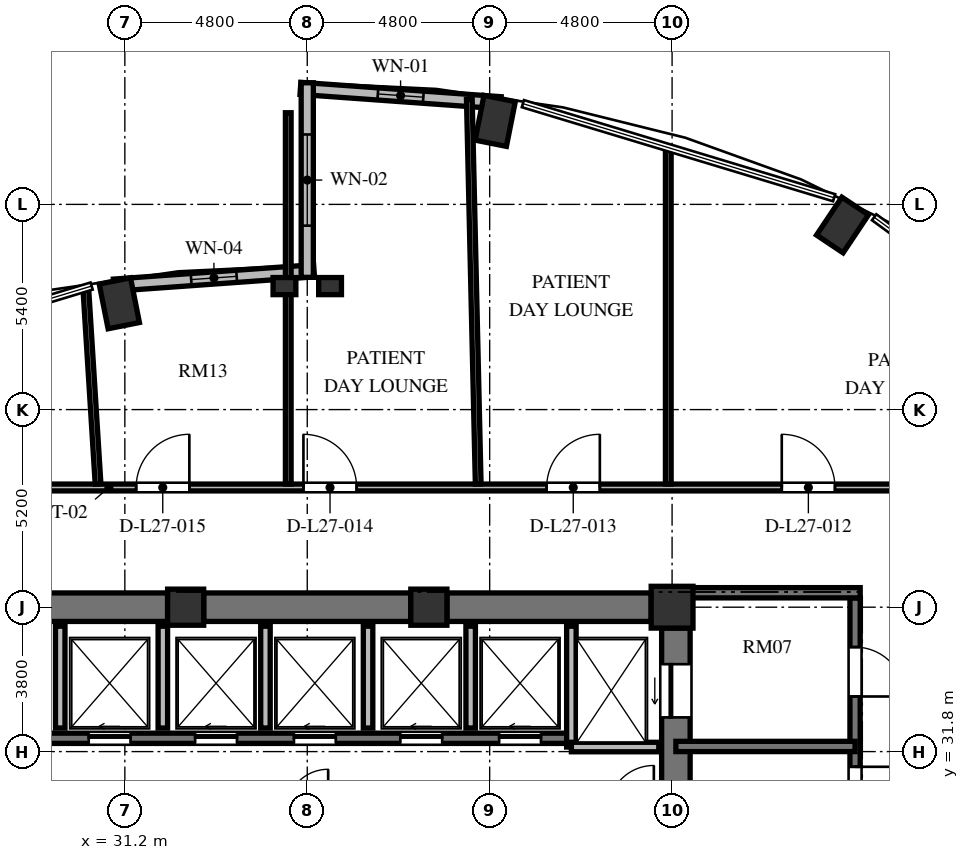
"""IFC4 building model, lengths in metres.
Left out: names, types, materials, properties, quantities, classifications, styles, units other than length and angle.
Written with IfcOpenShell. Run it as: python <this file> out.ifc"""

import sys

from ifc_helpers import new_model, si_unit, direction, frame, frame_2d, origin, origin_2d, place, context, subcontext, project, spatial, rectangle, extrude, element, fill, save


model = new_model("IFC4")
c1 = context("Model", 3, precision=1e-05, world=origin(), true_north=direction((0.0, 1.0)))
c2 = subcontext(c1, "Body", "Model", "MODEL_VIEW")
j1 = project(units=[si_unit("LENGTHUNIT", "METRE"), si_unit("PLANEANGLEUNIT", "RADIAN")], contexts=[c1])
p1 = place(None, origin())
s1 = spatial("IfcSite", under=j1, at=p1, CompositionType="ELEMENT")
p2 = place(p1, origin())
s2 = spatial("IfcBuilding", under=s1, at=p2, CompositionType="ELEMENT")
p3 = place(p2, frame((0.0, 0.0, 107.28)))
s3 = spatial("IfcBuildingStorey", under=s2, at=p3, CompositionType="ELEMENT", Elevation=107.28)
for number, where, z_axis, x_axis in (
    (1, (50.084, 45.657, 0.0), (0.0, 0.0, 1.0), (0.556, 0.831, 0.0)),
    (2, (40.946, 48.397, 0.0), (0.0, 0.0, 1.0), (0.195, 0.981, 0.0)),
    (3, (31.054, 43.597, 0.0), (0.0, 0.0, 1.0), (-0.195, 0.981, 0.0)),
):
    element("IfcColumn", number, at=place(p3, frame(where, z_axis=z_axis, x_axis=x_axis)), inside=s3, PredefinedType="COLUMN", context=c2, shape_type="SweptSolid", body=[
        extrude(rectangle(XDim=1.2, YDim=0.84, at=origin_2d()), origin(), (0.0, 0.0, 1.0), 3.648),
    ])
p4 = place(p3, frame((45.6, 35.6, 0.0), z_axis=(0.0, 0.0, 1.0), x_axis=(1.0, 0.0, 0.0)))
e4 = element("IfcColumn", 4, at=p4, inside=s3, PredefinedType="COLUMN", context=c2, shape_type="SweptSolid", body=[
    extrude(rectangle(XDim=1.1, YDim=1.1, at=origin_2d()), origin(), (0.0, 0.0, 1.0), 3.648),
])
for number, where, z_axis, x_axis in (
    (5, (39.2, 35.6, 0.0), (0.0, 0.0, 1.0), (1.0, 0.0, 0.0)),
    (6, (32.8, 35.6, 0.0), (0.0, 0.0, 1.0), (1.0, 0.0, 0.0)),
):
    element("IfcColumn", number, at=place(p3, frame(where, z_axis=z_axis, x_axis=x_axis)), inside=s3, PredefinedType="COLUMN", context=c2, shape_type="SweptSolid", body=[
        extrude(rectangle(XDim=0.95, YDim=0.95, at=origin_2d()), origin(), (0.0, 0.0, 1.0), 3.648),
    ])
for number, where, z_axis, x_axis in (
    (7, (35.4, 44.05, 0.0), (0.0, 0.0, 1.0), (1.0, 0.0, 0.0)),
    (8, (36.6, 44.05, 0.0), (0.0, 0.0, 1.0), (1.0, 0.0, 0.0)),
):
    element("IfcColumn", number, at=place(p3, frame(where, z_axis=z_axis, x_axis=x_axis)), inside=s3, PredefinedType="PILASTER", context=c2, shape_type="SweptSolid", body=[
        extrude(rectangle(XDim=0.6, YDim=0.45, at=origin_2d()), origin(), (0.0, 0.0, 1.0), 3.648),
    ])
p5 = place(p3, frame((45.7, 20.95, 0.0), z_axis=(0.0, 0.0, 1.0), x_axis=(0.0, 1.0, 0.0)))
e9 = element("IfcWall", 9, at=p5, inside=s3, PredefinedType="SHEAR", context=c2, shape_type="SweptSolid", body=[
    extrude(rectangle(XDim=14.1, YDim=0.75, at=frame_2d((7.05, 0.0))), origin(), (0.0, 0.0, 1.0), 3.648),
])
p6 = place(p5, frame((11.75, 0.0, 0.0)))
e10 = element("IfcOpeningElement", 10, at=p6, cuts=e9, PredefinedType="OPENING", context=c2, shape_type="SweptSolid", body=[
    extrude(rectangle(XDim=1.4, YDim=2.3, at=frame_2d((0.7, 1.15))), frame((0.0, 0.385, 0.0), z_axis=(0.0, -1.0, 0.0), x_axis=(1.0, 0.0, 0.0)), (0.0, 0.0, 1.0), 0.77),
])
p7 = place(p5, frame((0.95, 0.0, 0.0)))
e11 = element("IfcOpeningElement", 11, at=p7, cuts=e9, PredefinedType="OPENING", context=c2, shape_type="SweptSolid", body=[
    extrude(rectangle(XDim=1.4, YDim=2.3, at=frame_2d((0.7, 1.15))), frame((0.0, 0.385, 0.0), z_axis=(0.0, -1.0, 0.0), x_axis=(1.0, 0.0, 0.0)), (0.0, 0.0, 1.0), 0.77),
])
p8 = place(p3, frame((26.95, 35.6, 0.0), z_axis=(0.0, 0.0, 1.0), x_axis=(1.0, 0.0, 0.0)))
e12 = element("IfcWall", 12, at=p8, inside=s3, PredefinedType="SHEAR", context=c2, shape_type="SweptSolid", body=[
    extrude(rectangle(XDim=5.375, YDim=0.75, at=frame_2d((2.688, 0.0))), origin(), (0.0, 0.0, 1.0), 3.648),
])
p9 = place(p3, frame((33.275, 35.6, 0.0), z_axis=(0.0, 0.0, 1.0), x_axis=(1.0, 0.0, 0.0)))
e13 = element("IfcWall", 13, at=p9, inside=s3, PredefinedType="SHEAR", context=c2, shape_type="SweptSolid", body=[
    extrude(rectangle(XDim=5.45, YDim=0.75, at=frame_2d((2.725, 0.0))), origin(), (0.0, 0.0, 1.0), 3.648),
])
p10 = place(p3, frame((39.675, 35.6, 0.0), z_axis=(0.0, 0.0, 1.0), x_axis=(1.0, 0.0, 0.0)))
e14 = element("IfcWall", 14, at=p10, inside=s3, PredefinedType="SHEAR", context=c2, shape_type="SweptSolid", body=[
    extrude(rectangle(XDim=5.375, YDim=0.75, at=frame_2d((2.688, 0.0))), origin(), (0.0, 0.0, 1.0), 3.648),
])
p11 = place(p3, frame((41.091, 48.875, 0.0), z_axis=(0.0, 0.0, 1.0), x_axis=(-0.997432364291, 0.071614793619, 0.0)))
e15 = element("IfcWall", 15, at=p11, inside=s3, PredefinedType="SOLIDWALL", context=c2, shape_type="SweptSolid", body=[
    extrude(rectangle(XDim=5.284, YDim=0.32, at=frame_2d((2.642, 0.0))), origin(), (0.0, 0.0, 1.0), 3.428),
])
p12 = place(p11, frame((2.042, 0.0, 0.85)))
e16 = element("IfcOpeningElement", 16, at=p12, cuts=e15, PredefinedType="OPENING", context=c2, shape_type="SweptSolid", body=[
    extrude(rectangle(XDim=1.2, YDim=2.2, at=frame_2d((0.6, 1.1))), frame((0.0, 0.17, 0.0), z_axis=(0.0, -1.0, 0.0), x_axis=(1.0, 0.0, 0.0)), (0.0, 0.0, 1.0), 0.34),
])
p13 = place(p3, frame((36.179, 44.453, 0.0), z_axis=(0.0, 0.0, 1.0), x_axis=(-0.997431890304, -0.071621394884, 0.0)))
e17 = element("IfcWall", 17, at=p13, inside=s3, PredefinedType="SOLIDWALL", context=c2, shape_type="SweptSolid", body=[
    extrude(rectangle(XDim=5.284, YDim=0.32, at=frame_2d((2.642, 0.0))), origin(), (0.0, 0.0, 1.0), 3.428),
])
p14 = place(p13, frame((2.042, 0.0, 0.85)))
e18 = element("IfcOpeningElement", 18, at=p14, cuts=e17, PredefinedType="OPENING", context=c2, shape_type="SweptSolid", body=[
    extrude(rectangle(XDim=1.2, YDim=1.8, at=frame_2d((0.6, 0.9))), frame((0.0, 0.17, 0.0), z_axis=(0.0, -1.0, 0.0), x_axis=(1.0, 0.0, 0.0)), (0.0, 0.0, 1.0), 0.34),
])
p15 = place(p3, frame((36.0, 49.4, 0.0), z_axis=(0.0, 0.0, 1.0), x_axis=(0.0, -1.0, 0.0)))
e19 = element("IfcWall", 19, at=p15, inside=s3, PredefinedType="SOLIDWALL", context=c2, shape_type="SweptSolid", body=[
    extrude(rectangle(XDim=5.12, YDim=0.32, at=frame_2d((2.56, 0.0))), origin(), (0.0, 0.0, 1.0), 3.428),
])
p16 = place(p15, frame((1.36, 0.0, 0.84)))
e20 = element("IfcOpeningElement", 20, at=p16, cuts=e19, PredefinedType="OPENING", context=c2, shape_type="SweptSolid", body=[
    extrude(rectangle(XDim=2.4, YDim=2.04, at=frame_2d((1.2, 1.02))), frame((0.0, 0.17, 0.0), z_axis=(0.0, -1.0, 0.0), x_axis=(1.0, 0.0, 0.0)), (0.0, 0.0, 1.0), 0.34),
])
p17 = place(p3, frame((26.55, 32.15, 0.0), z_axis=(0.0, 0.0, 1.0), x_axis=(1.0, 0.0, 0.0)))
e21 = element("IfcWall", 21, at=p17, inside=s3, PredefinedType="SHEAR", context=c2, shape_type="SweptSolid", body=[
    extrude(rectangle(XDim=16.4, YDim=0.27, at=frame_2d((8.2, 0.0))), origin(), (0.0, 0.0, 1.0), 3.648),
])
p18 = place(p17, frame((1.1, 0.0, 0.0)))
e22 = element("IfcOpeningElement", 22, at=p18, cuts=e21, PredefinedType="OPENING", context=c2, shape_type="SweptSolid", body=[
    extrude(rectangle(XDim=1.1, YDim=2.2, at=frame_2d((0.55, 1.1))), frame((0.0, 0.145, 0.0), z_axis=(0.0, -1.0, 0.0), x_axis=(1.0, 0.0, 0.0)), (0.0, 0.0, 1.0), 0.29),
])
p19 = place(p17, frame((3.7, 0.0, 0.0)))
e23 = element("IfcOpeningElement", 23, at=p19, cuts=e21, PredefinedType="OPENING", context=c2, shape_type="SweptSolid", body=[
    extrude(rectangle(XDim=1.1, YDim=2.2, at=frame_2d((0.55, 1.1))), frame((0.0, 0.145, 0.0), z_axis=(0.0, -1.0, 0.0), x_axis=(1.0, 0.0, 0.0)), (0.0, 0.0, 1.0), 0.29),
])
p20 = place(p17, frame((6.5, 0.0, 0.0)))
e24 = element("IfcOpeningElement", 24, at=p20, cuts=e21, PredefinedType="OPENING", context=c2, shape_type="SweptSolid", body=[
    extrude(rectangle(XDim=1.1, YDim=2.2, at=frame_2d((0.55, 1.1))), frame((0.0, 0.145, 0.0), z_axis=(0.0, -1.0, 0.0), x_axis=(1.0, 0.0, 0.0)), (0.0, 0.0, 1.0), 0.29),
])
p21 = place(p17, frame((9.1, 0.0, 0.0)))
e25 = element("IfcOpeningElement", 25, at=p21, cuts=e21, PredefinedType="OPENING", context=c2, shape_type="SweptSolid", body=[
    extrude(rectangle(XDim=1.1, YDim=2.2, at=frame_2d((0.55, 1.1))), frame((0.0, 0.145, 0.0), z_axis=(0.0, -1.0, 0.0), x_axis=(1.0, 0.0, 0.0)), (0.0, 0.0, 1.0), 0.29),
])
p22 = place(p17, frame((11.9, 0.0, 0.0)))
e26 = element("IfcOpeningElement", 26, at=p22, cuts=e21, PredefinedType="OPENING", context=c2, shape_type="SweptSolid", body=[
    extrude(rectangle(XDim=1.1, YDim=2.2, at=frame_2d((0.55, 1.1))), frame((0.0, 0.145, 0.0), z_axis=(0.0, -1.0, 0.0), x_axis=(1.0, 0.0, 0.0)), (0.0, 0.0, 1.0), 0.29),
])
p23 = place(p17, frame((14.5, 0.0, 0.0)))
e27 = element("IfcOpeningElement", 27, at=p23, cuts=e21, PredefinedType="OPENING", context=c2, shape_type="SweptSolid", body=[
    extrude(rectangle(XDim=1.1, YDim=2.2, at=frame_2d((0.55, 1.1))), frame((0.0, 0.145, 0.0), z_axis=(0.0, -1.0, 0.0), x_axis=(1.0, 0.0, 0.0)), (0.0, 0.0, 1.0), 0.29),
])
p24 = place(p3, frame((42.95, 31.92, 0.0), z_axis=(0.0, 0.0, 1.0), x_axis=(0.0, 1.0, 0.0)))
e28 = element("IfcWall", 28, at=p24, inside=s3, PredefinedType="SOLIDWALL", context=c2, shape_type="SweptSolid", body=[
    extrude(rectangle(XDim=3.18, YDim=0.25, at=frame_2d((1.59, 0.0))), origin(), (0.0, 0.0, 1.0), 3.428),
])
p25 = place(p3, frame((42.95, 31.92, 0.0), z_axis=(0.0, 0.0, 1.0), x_axis=(1.0, 0.0, 0.0)))
e29 = element("IfcWall", 29, at=p25, inside=s3, PredefinedType="SOLIDWALL", context=c2, shape_type="SweptSolid", body=[
    extrude(rectangle(XDim=2.3, YDim=0.25, at=frame_2d((1.15, 0.0))), origin(), (0.0, 0.0, 1.0), 3.428),
])
for number, where, z_axis, x_axis in (
    (30, (29.5, 32.42, 0.0), (0.0, 0.0, 1.0), (0.0, 1.0, 0.0)),
    (31, (32.2, 32.42, 0.0), (0.0, 0.0, 1.0), (0.0, 1.0, 0.0)),
    (32, (34.9, 32.42, 0.0), (0.0, 0.0, 1.0), (0.0, 1.0, 0.0)),
    (33, (37.6, 32.42, 0.0), (0.0, 0.0, 1.0), (0.0, 1.0, 0.0)),
    (34, (40.3, 32.42, 0.0), (0.0, 0.0, 1.0), (0.0, 1.0, 0.0)),
):
    element("IfcWall", number, at=place(p3, frame(where, z_axis=z_axis, x_axis=x_axis)), inside=s3, PredefinedType="SOLIDWALL", context=c2, shape_type="SweptSolid", body=[
        extrude(rectangle(XDim=2.68, YDim=0.25, at=frame_2d((1.34, 0.0))), origin(), (0.0, 0.0, 1.0), 3.428),
    ])
p26 = place(p3, frame((50.415, 35.845, 0.0), z_axis=(0.0, 0.0, 1.0), x_axis=(0.0, -1.0, 0.0)))
e35 = element("IfcWall", 35, at=p26, inside=s3, PredefinedType="SHEAR", context=c2, shape_type="SweptSolid", body=[
    extrude(rectangle(XDim=15.825, YDim=0.27, at=frame_2d((7.913, 0.0))), origin(), (0.0, 0.0, 1.0), 3.648),
])
p27 = place(p26, frame((4.445, 0.0, 0.0)))
e36 = element("IfcOpeningElement", 36, at=p27, cuts=e35, PredefinedType="OPENING", context=c2, shape_type="SweptSolid", body=[
    extrude(rectangle(XDim=1.2, YDim=2.15, at=frame_2d((0.6, 1.075))), frame((0.0, 0.145, 0.0), z_axis=(0.0, -1.0, 0.0), x_axis=(1.0, 0.0, 0.0)), (0.0, 0.0, 1.0), 0.29),
])
p28 = place(p26, frame((1.295, 0.0, 0.0)))
e37 = element("IfcOpeningElement", 37, at=p28, cuts=e35, PredefinedType="OPENING", context=c2, shape_type="SweptSolid", body=[
    extrude(rectangle(XDim=1.3, YDim=2.2, at=frame_2d((0.65, 1.1))), frame((0.0, 0.145, 0.0), z_axis=(0.0, -1.0, 0.0), x_axis=(1.0, 0.0, 0.0)), (0.0, 0.0, 1.0), 0.29),
])
p29 = place(p26, frame((13.095, 0.0, 0.0)))
e38 = element("IfcOpeningElement", 38, at=p29, cuts=e35, PredefinedType="OPENING", context=c2, shape_type="SweptSolid", body=[
    extrude(rectangle(XDim=1.3, YDim=2.2, at=frame_2d((0.65, 1.1))), frame((0.0, 0.145, 0.0), z_axis=(0.0, -1.0, 0.0), x_axis=(1.0, 0.0, 0.0)), (0.0, 0.0, 1.0), 0.29),
])
p30 = place(p3, frame((46.075, 35.98, 0.0), z_axis=(0.0, 0.0, 1.0), x_axis=(1.0, 0.0, 0.0)))
e39 = element("IfcWall", 39, at=p30, inside=s3, PredefinedType="SHEAR", context=c2, shape_type="SweptSolid", body=[
    extrude(rectangle(XDim=4.475, YDim=0.27, at=frame_2d((2.238, 0.0))), origin(), (0.0, 0.0, 1.0), 3.648),
])
p31 = place(p3, frame((45.7, 31.935, 0.0), z_axis=(0.0, 0.0, 1.0), x_axis=(1.0, 0.0, 0.0)))
e40 = element("IfcWall", 40, at=p31, inside=s3, PredefinedType="SHEAR", context=c2, shape_type="SweptSolid", body=[
    extrude(rectangle(XDim=4.715, YDim=0.27, at=frame_2d((2.357, 0.0))), origin(), (0.0, 0.0, 1.0), 3.648),
])
p32 = place(p3, frame((23.31, 38.75, 0.0), z_axis=(0.0, 0.0, 1.0), x_axis=(1.0, 0.0, 0.0)))
e41 = element("IfcWall", 41, at=p32, inside=s3, PredefinedType="PARTITIONING", context=c2, shape_type="SweptSolid", body=[
    extrude(rectangle(XDim=29.88, YDim=0.18, at=frame_2d((14.94, 0.0))), origin(), (0.0, 0.0, 1.0), 3.053),
])
p33 = place(p32, frame((25.176, 0.0, 0.0)))
e42 = element("IfcOpeningElement", 42, at=p33, cuts=e41, PredefinedType="OPENING", context=c2, shape_type="SweptSolid", body=[
    extrude(rectangle(XDim=1.4, YDim=2.2, at=frame_2d((0.7, 1.1))), frame((0.0, 0.1, 0.0), z_axis=(0.0, -1.0, 0.0), x_axis=(1.0, 0.0, 0.0)), (0.0, 0.0, 1.0), 0.2),
])
p34 = place(p32, frame((18.989, 0.0, 0.0)))
e43 = element("IfcOpeningElement", 43, at=p34, cuts=e41, PredefinedType="OPENING", context=c2, shape_type="SweptSolid", body=[
    extrude(rectangle(XDim=1.4, YDim=2.2, at=frame_2d((0.7, 1.1))), frame((0.0, 0.1, 0.0), z_axis=(0.0, -1.0, 0.0), x_axis=(1.0, 0.0, 0.0)), (0.0, 0.0, 1.0), 0.2),
])
p35 = place(p32, frame((12.589, 0.0, 0.0)))
e44 = element("IfcOpeningElement", 44, at=p35, cuts=e41, PredefinedType="OPENING", context=c2, shape_type="SweptSolid", body=[
    extrude(rectangle(XDim=1.4, YDim=2.2, at=frame_2d((0.7, 1.1))), frame((0.0, 0.1, 0.0), z_axis=(0.0, -1.0, 0.0), x_axis=(1.0, 0.0, 0.0)), (0.0, 0.0, 1.0), 0.2),
])
p36 = place(p32, frame((8.188, 0.0, 0.0)))
e45 = element("IfcOpeningElement", 45, at=p36, cuts=e41, PredefinedType="OPENING", context=c2, shape_type="SweptSolid", body=[
    extrude(rectangle(XDim=1.4, YDim=2.2, at=frame_2d((0.7, 1.1))), frame((0.0, 0.1, 0.0), z_axis=(0.0, -1.0, 0.0), x_axis=(1.0, 0.0, 0.0)), (0.0, 0.0, 1.0), 0.2),
])
p37 = place(p3, frame((30.495, 38.84, 0.0), z_axis=(0.0, 0.0, 1.0), x_axis=(-0.062595600558, 0.998038972581, 0.0)))
e46 = element("IfcWall", 46, at=p37, inside=s3, PredefinedType="PARTITIONING", context=c2, shape_type="SweptSolid", body=[
    extrude(rectangle(XDim=5.176, YDim=0.15, at=frame_2d((2.588, 0.0))), origin(), (0.0, 0.0, 1.0), 3.428),
])
p38 = place(p3, frame((35.5, 38.84, 0.0), z_axis=(0.0, 0.0, 1.0), x_axis=(0.0, 1.0, 0.0)))
e47 = element("IfcWall", 47, at=p38, inside=s3, PredefinedType="PARTITIONING", context=c2, shape_type="SweptSolid", body=[
    extrude(rectangle(XDim=9.772, YDim=0.15, at=frame_2d((4.886, 0.0))), origin(), (0.0, 0.0, 1.0), 3.428),
])
p39 = place(p3, frame((40.498, 38.84, 0.0), z_axis=(0.0, 0.0, 1.0), x_axis=(-0.023053353508, 0.999734236131, 0.0)))
e48 = element("IfcWall", 48, at=p39, inside=s3, PredefinedType="PARTITIONING", context=c2, shape_type="SweptSolid", body=[
    extrude(rectangle(XDim=10.124, YDim=0.15, at=frame_2d((5.062, 0.0))), origin(), (0.0, 0.0, 1.0), 2.813),
])
p40 = place(p3, frame((45.5, 38.84, 0.0), z_axis=(0.0, 0.0, 1.0), x_axis=(0.0, 1.0, 0.0)))
e49 = element("IfcWall", 49, at=p40, inside=s3, PredefinedType="PARTITIONING", context=c2, shape_type="SweptSolid", body=[
    extrude(rectangle(XDim=8.84, YDim=0.15, at=frame_2d((4.42, 0.0))), origin(), (0.0, 0.0, 1.0), 3.428),
])
p41 = place(p12, origin())
e50 = element("IfcWindow", 50, at=p41, inside=s3, PartitioningType="SINGLE_PANEL", PredefinedType="WINDOW", context=c2, shape_type="SweptSolid", body=[
    extrude(rectangle(XDim=1.2, YDim=2.2, at=frame_2d((0.6, 1.1))), frame((0.0, 0.03, 0.0), z_axis=(0.0, -1.0, 0.0), x_axis=(1.0, 0.0, 0.0)), (0.0, 0.0, 1.0), 0.06),
])
fill(e16, e50)
p42 = place(p14, origin())
e51 = element("IfcWindow", 51, at=p42, inside=s3, PartitioningType="SINGLE_PANEL", PredefinedType="WINDOW", context=c2, shape_type="SweptSolid", body=[
    extrude(rectangle(XDim=1.2, YDim=1.8, at=frame_2d((0.6, 0.9))), frame((0.0, 0.03, 0.0), z_axis=(0.0, -1.0, 0.0), x_axis=(1.0, 0.0, 0.0)), (0.0, 0.0, 1.0), 0.06),
])
fill(e18, e51)
p43 = place(p16, origin())
e52 = element("IfcWindow", 52, at=p43, inside=s3, PartitioningType="SINGLE_PANEL", PredefinedType="WINDOW", context=c2, shape_type="SweptSolid", body=[
    extrude(rectangle(XDim=2.4, YDim=2.04, at=frame_2d((1.2, 1.02))), frame((0.0, 0.03, 0.0), z_axis=(0.0, -1.0, 0.0), x_axis=(1.0, 0.0, 0.0)), (0.0, 0.0, 1.0), 0.06),
])
fill(e20, e52)
p44 = place(p19, origin())
e53 = element("IfcDoor", 53, at=p44, inside=s3, OperationType="SLIDING_TO_LEFT", PredefinedType="DOOR", context=c2, shape_type="SweptSolid", body=[
    extrude(rectangle(XDim=1.1, YDim=2.2, at=frame_2d((0.55, 1.1))), frame((0.0, 0.025, 0.0), z_axis=(0.0, -1.0, 0.0), x_axis=(1.0, 0.0, 0.0)), (0.0, 0.0, 1.0), 0.05),
])
fill(e23, e53)
p45 = place(p20, origin())
e54 = element("IfcDoor", 54, at=p45, inside=s3, OperationType="SLIDING_TO_LEFT", PredefinedType="DOOR", context=c2, shape_type="SweptSolid", body=[
    extrude(rectangle(XDim=1.1, YDim=2.2, at=frame_2d((0.55, 1.1))), frame((0.0, 0.025, 0.0), z_axis=(0.0, -1.0, 0.0), x_axis=(1.0, 0.0, 0.0)), (0.0, 0.0, 1.0), 0.05),
])
fill(e24, e54)
p46 = place(p21, origin())
e55 = element("IfcDoor", 55, at=p46, inside=s3, OperationType="SLIDING_TO_LEFT", PredefinedType="DOOR", context=c2, shape_type="SweptSolid", body=[
    extrude(rectangle(XDim=1.1, YDim=2.2, at=frame_2d((0.55, 1.1))), frame((0.0, 0.025, 0.0), z_axis=(0.0, -1.0, 0.0), x_axis=(1.0, 0.0, 0.0)), (0.0, 0.0, 1.0), 0.05),
])
fill(e25, e55)
p47 = place(p22, origin())
e56 = element("IfcDoor", 56, at=p47, inside=s3, OperationType="SLIDING_TO_LEFT", PredefinedType="DOOR", context=c2, shape_type="SweptSolid", body=[
    extrude(rectangle(XDim=1.1, YDim=2.2, at=frame_2d((0.55, 1.1))), frame((0.0, 0.025, 0.0), z_axis=(0.0, -1.0, 0.0), x_axis=(1.0, 0.0, 0.0)), (0.0, 0.0, 1.0), 0.05),
])
fill(e26, e56)
p48 = place(p23, origin())
e57 = element("IfcDoor", 57, at=p48, inside=s3, OperationType="SLIDING_TO_LEFT", PredefinedType="DOOR", context=c2, shape_type="SweptSolid", body=[
    extrude(rectangle(XDim=1.1, YDim=2.2, at=frame_2d((0.55, 1.1))), frame((0.0, 0.025, 0.0), z_axis=(0.0, -1.0, 0.0), x_axis=(1.0, 0.0, 0.0)), (0.0, 0.0, 1.0), 0.05),
])
fill(e27, e57)
p49 = place(p6, origin())
e58 = element("IfcDoor", 58, at=p49, inside=s3, OperationType="SLIDING_TO_LEFT", PredefinedType="DOOR", context=c2, shape_type="SweptSolid", body=[
    extrude(rectangle(XDim=1.4, YDim=2.3, at=frame_2d((0.7, 1.15))), frame((0.0, 0.025, 0.0), z_axis=(0.0, -1.0, 0.0), x_axis=(1.0, 0.0, 0.0)), (0.0, 0.0, 1.0), 0.05),
])
fill(e10, e58)
p50 = place(p27, origin())
e59 = element("IfcDoor", 59, at=p50, inside=s3, OperationType="SINGLE_SWING_LEFT", PredefinedType="DOOR", context=c2, shape_type="SweptSolid", body=[
    extrude(rectangle(XDim=1.2, YDim=2.15, at=frame_2d((0.6, 1.075))), frame((0.0, 0.025, 0.0), z_axis=(0.0, -1.0, 0.0), x_axis=(1.0, 0.0, 0.0)), (0.0, 0.0, 1.0), 0.05),
])
fill(e36, e59)
p51 = place(p28, origin())
e60 = element("IfcDoor", 60, at=p51, inside=s3, OperationType="SINGLE_SWING_RIGHT", PredefinedType="DOOR", context=c2, shape_type="SweptSolid", body=[
    extrude(rectangle(XDim=1.3, YDim=2.2, at=frame_2d((0.65, 1.1))), frame((0.0, 0.025, 0.0), z_axis=(0.0, -1.0, 0.0), x_axis=(1.0, 0.0, 0.0)), (0.0, 0.0, 1.0), 0.05),
])
fill(e37, e60)
p52 = place(p33, origin())
e61 = element("IfcDoor", 61, at=p52, inside=s3, OperationType="SINGLE_SWING_LEFT", PredefinedType="DOOR", context=c2, shape_type="SweptSolid", body=[
    extrude(rectangle(XDim=1.4, YDim=2.2, at=frame_2d((0.7, 1.1))), frame((0.0, 0.025, 0.0), z_axis=(0.0, -1.0, 0.0), x_axis=(1.0, 0.0, 0.0)), (0.0, 0.0, 1.0), 0.05),
])
fill(e42, e61)
p53 = place(p34, origin())
e62 = element("IfcDoor", 62, at=p53, inside=s3, OperationType="SINGLE_SWING_RIGHT", PredefinedType="DOOR", context=c2, shape_type="SweptSolid", body=[
    extrude(rectangle(XDim=1.4, YDim=2.2, at=frame_2d((0.7, 1.1))), frame((0.0, 0.025, 0.0), z_axis=(0.0, -1.0, 0.0), x_axis=(1.0, 0.0, 0.0)), (0.0, 0.0, 1.0), 0.05),
])
fill(e43, e62)
p54 = place(p35, origin())
e63 = element("IfcDoor", 63, at=p54, inside=s3, OperationType="SINGLE_SWING_LEFT", PredefinedType="DOOR", context=c2, shape_type="SweptSolid", body=[
    extrude(rectangle(XDim=1.4, YDim=2.2, at=frame_2d((0.7, 1.1))), frame((0.0, 0.025, 0.0), z_axis=(0.0, -1.0, 0.0), x_axis=(1.0, 0.0, 0.0)), (0.0, 0.0, 1.0), 0.05),
])
fill(e44, e63)
p55 = place(p36, origin())
e64 = element("IfcDoor", 64, at=p55, inside=s3, OperationType="SINGLE_SWING_RIGHT", PredefinedType="DOOR", context=c2, shape_type="SweptSolid", body=[
    extrude(rectangle(XDim=1.4, YDim=2.2, at=frame_2d((0.7, 1.1))), frame((0.0, 0.025, 0.0), z_axis=(0.0, -1.0, 0.0), x_axis=(1.0, 0.0, 0.0)), (0.0, 0.0, 1.0), 0.05),
])
fill(e45, e64)
save(model, sys.argv[1])
